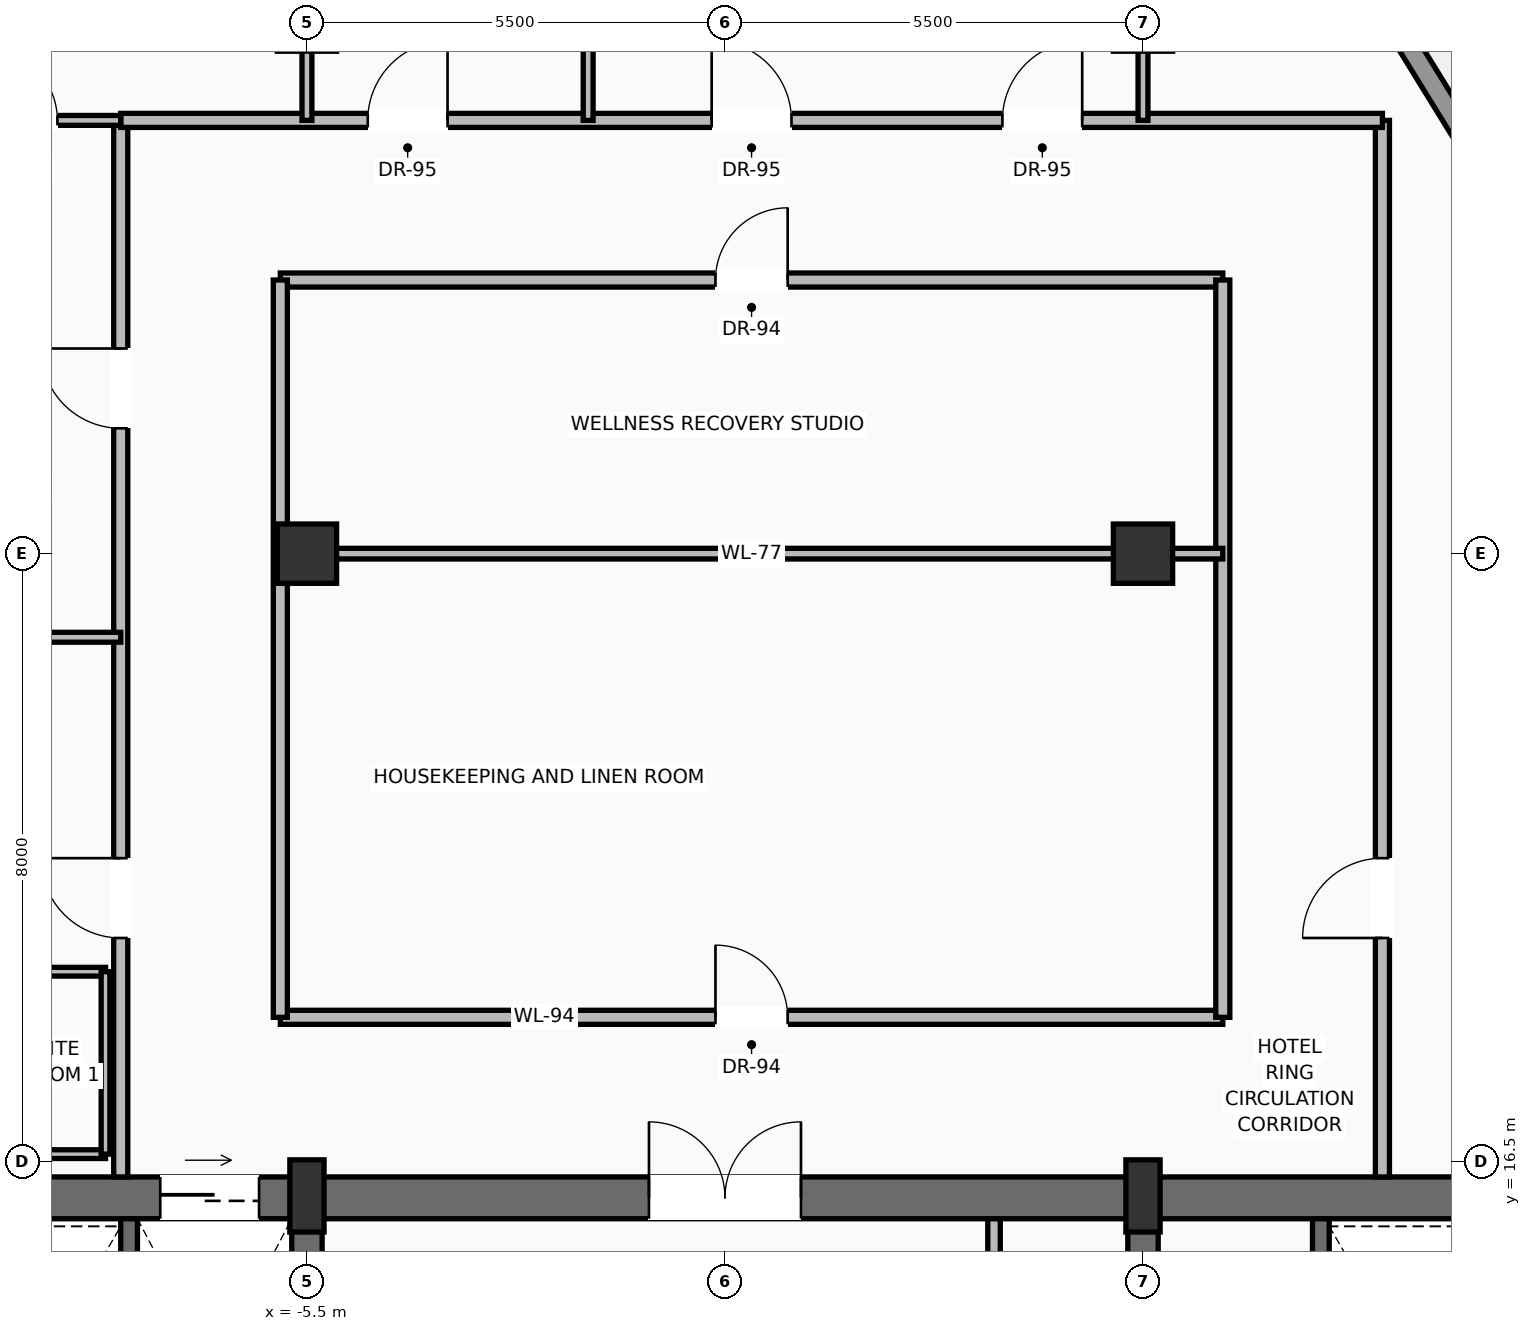
"""IFC4 building model, lengths in metres.
Left out: names, types, materials, properties, quantities, classifications, styles, units other than length and angle.
Written with IfcOpenShell. Run it as: python <this file> out.ifc"""

import sys

from ifc_helpers import new_model, si_unit, direction, frame, frame_2d, origin, origin_2d, place, context, subcontext, project, spatial, rectangle, extrude, source, transform, mapped, element, fill, save


model = new_model("IFC4")
c1 = context("Model", 3, precision=1e-05, world=origin(), true_north=direction((0.0, 1.0)))
c2 = subcontext(c1, "Body", "Model", "MODEL_VIEW")
j1 = project(units=[si_unit("LENGTHUNIT", "METRE"), si_unit("PLANEANGLEUNIT", "RADIAN")], contexts=[c1])
p1 = place(None, origin())
s1 = spatial("IfcSite", under=j1, at=p1, CompositionType="ELEMENT")
p2 = place(p1, origin())
s2 = spatial("IfcBuilding", under=s1, at=p2, CompositionType="ELEMENT")
p3 = place(p2, frame((0.0, 0.0, 240.7)))
s3 = spatial("IfcBuildingStorey", under=s2, at=p3, CompositionType="ELEMENT", Elevation=240.7)
p4 = place(p3, frame((-10.7, 16.025, 0.0), z_axis=(0.0, 0.0, 1.0), x_axis=(1.0, 0.0, 0.0)))
e1 = element("IfcWall", 1, at=p4, inside=s3, PredefinedType="SHEAR", context=c2, shape_type="SweptSolid", body=[
    extrude(rectangle(XDim=21.4, YDim=0.55, at=frame_2d((10.7, 0.0))), origin(), (0.0, 0.0, 1.0), 3.24),
])
p5 = place(p4, frame((3.27, 0.0, 0.0)))
e2 = element("IfcOpeningElement", 2, at=p5, cuts=e1, PredefinedType="OPENING", context=c2, shape_type="SweptSolid", body=[
    extrude(rectangle(XDim=1.3, YDim=2.3, at=frame_2d((0.65, 1.15))), frame((0.0, 0.285, 0.0), z_axis=(0.0, -1.0, 0.0), x_axis=(1.0, 0.0, 0.0)), (0.0, 0.0, 1.0), 0.57),
])
p6 = place(p4, frame((9.7, 0.0, 0.0)))
e3 = element("IfcOpeningElement", 3, at=p6, cuts=e1, PredefinedType="OPENING", context=c2, shape_type="SweptSolid", body=[
    extrude(rectangle(XDim=2.0, YDim=2.4, at=frame_2d((1.0, 1.2))), frame((0.0, 0.285, 0.0), z_axis=(0.0, -1.0, 0.0), x_axis=(1.0, 0.0, 0.0)), (0.0, 0.0, 1.0), 0.57),
])
p7 = place(p3, frame((-5.5, 0.575, 0.0), z_axis=(0.0, 0.0, 1.0), x_axis=(0.0, 1.0, 0.0)))
e4 = element("IfcWall", 4, at=p7, inside=s3, PredefinedType="SHEAR", context=c2, shape_type="SweptSolid", body=[
    extrude(rectangle(XDim=15.45, YDim=0.4, at=frame_2d((7.725, 0.0))), origin(), (0.0, 0.0, 1.0), 3.24),
])
p8 = place(p7, frame((8.925, 0.0, 0.0)))
e5 = element("IfcOpeningElement", 5, at=p8, cuts=e4, PredefinedType="OPENING", context=c2, shape_type="SweptSolid", body=[
    extrude(rectangle(XDim=1.1, YDim=2.2, at=frame_2d((0.55, 1.1))), frame((0.0, 0.21, 0.0), z_axis=(0.0, -1.0, 0.0), x_axis=(1.0, 0.0, 0.0)), (0.0, 0.0, 1.0), 0.42),
])
p9 = place(p3, frame((5.5, 0.575, 0.0), z_axis=(0.0, 0.0, 1.0), x_axis=(0.0, 1.0, 0.0)))
e6 = element("IfcWall", 6, at=p9, inside=s3, PredefinedType="SHEAR", context=c2, shape_type="SweptSolid", body=[
    extrude(rectangle(XDim=15.45, YDim=0.4, at=frame_2d((7.725, 0.0))), origin(), (0.0, 0.0, 1.0), 3.24),
])
p10 = place(p9, frame((8.925, 0.0, 0.0)))
e7 = element("IfcOpeningElement", 7, at=p10, cuts=e6, PredefinedType="OPENING", context=c2, shape_type="SweptSolid", body=[
    extrude(rectangle(XDim=1.1, YDim=2.2, at=frame_2d((0.55, 1.1))), frame((0.0, 0.21, 0.0), z_axis=(0.0, -1.0, 0.0), x_axis=(1.0, 0.0, 0.0)), (0.0, 0.0, 1.0), 0.42),
])
m1 = source(origin(), c2, "Body", "SweptSolid", [
    extrude(rectangle(XDim=0.45, YDim=0.95, at=origin_2d()), origin(), (0.0, 0.0, 1.0), 3.45),
])
for number, where, z_axis, x_axis in (
    (8, (-5.5, 16.05, 0.0), (0.0, 0.0, 1.0), (1.0, 0.0, 0.0)),
    (9, (5.5, 16.05, 0.0), (0.0, 0.0, 1.0), (1.0, 0.0, 0.0)),
):
    element("IfcColumn", number, at=place(p3, frame(where, z_axis=z_axis, x_axis=x_axis)), inside=s3, PredefinedType="PILASTER", context=c2, shape_type="MappedRepresentation", body=[
        mapped(m1, transform((0.0, 0.0, 0.0), scale=1.0)),
    ])
m2 = source(origin(), c2, "Body", "SweptSolid", [
    extrude(rectangle(XDim=0.78, YDim=0.78, at=origin_2d()), origin(), (0.0, 0.0, 1.0), 3.45),
])
for number, where, z_axis, x_axis in (
    (10, (-5.5, 24.5, 0.0), (0.0, 0.0, 1.0), (1.0, 0.0, 0.0)),
    (11, (5.5, 24.5, 0.0), (0.0, 0.0, 1.0), (1.0, 0.0, 0.0)),
):
    element("IfcColumn", number, at=place(p3, frame(where, z_axis=z_axis, x_axis=x_axis)), inside=s3, PredefinedType="COLUMN", context=c2, shape_type="MappedRepresentation", body=[
        mapped(m2, transform((0.0, 0.0, 0.0), scale=1.0)),
    ])
p11 = place(p3, frame((8.468, 32.044, 0.0), z_axis=(0.0, 0.0, 1.0), x_axis=(0.524731986951, -0.851267491374, 0.0)))
e12 = element("IfcWall", 12, at=p11, inside=s3, PredefinedType="SOLIDWALL", context=c2, shape_type="SweptSolid", body=[
    extrude(rectangle(XDim=19.658, YDim=0.28, at=frame_2d((9.829, 0.0))), origin(), (0.0, 0.0, 1.0), 2.82),
])
p12 = place(p11, frame((4.718, 0.0, 0.0)))
e13 = element("IfcOpeningElement", 13, at=p12, cuts=e12, PredefinedType="OPENING", context=c2, shape_type="SweptSolid", body=[
    extrude(rectangle(XDim=1.6, YDim=2.35, at=frame_2d((0.8, 1.175))), frame((0.0, 0.15, 0.0), z_axis=(0.0, -1.0, 0.0), x_axis=(1.0, 0.0, 0.0)), (0.0, 0.0, 1.0), 0.3),
])
p13 = place(p11, frame((13.368, 0.0, 0.9)))
e14 = element("IfcOpeningElement", 14, at=p13, cuts=e12, PredefinedType="OPENING", context=c2, shape_type="SweptSolid", body=[
    extrude(rectangle(XDim=2.0, YDim=1.75, at=frame_2d((1.0, 0.875))), frame((0.0, 0.15, 0.0), z_axis=(0.0, -1.0, 0.0), x_axis=(1.0, 0.0, 0.0)), (0.0, 0.0, 1.0), 0.3),
])
for number, where, z_axis, x_axis in (
    (15, (-7.84, 11.87, 0.0), (0.0, 0.0, 1.0), (0.0, 1.0, 0.0)),
    (16, (7.84, 11.87, 0.0), (0.0, 0.0, 1.0), (0.0, 1.0, 0.0)),
):
    element("IfcWall", number, at=place(p3, frame(where, z_axis=z_axis, x_axis=x_axis)), inside=s3, PredefinedType="SOLIDWALL", context=c2, shape_type="SweptSolid", body=[
        extrude(rectangle(XDim=3.88, YDim=0.22, at=frame_2d((1.94, 0.0))), origin(), (0.0, 0.0, 1.0), 3.24),
    ])
p14 = place(p3, frame((3.54, 11.22, 0.0), z_axis=(0.0, 0.0, 1.0), x_axis=(0.0, 1.0, 0.0)))
e17 = element("IfcWall", 17, at=p14, inside=s3, PredefinedType="PARTITIONING", context=c2, shape_type="SweptSolid", body=[
    extrude(rectangle(XDim=4.53, YDim=0.165, at=frame_2d((2.265, 0.0))), origin(), (0.0, 0.0, 1.0), 3.232),
])
p15 = place(p14, frame((1.25, 0.0, 0.0)))
e18 = element("IfcOpeningElement", 18, at=p15, cuts=e17, PredefinedType="OPENING", context=c2, shape_type="SweptSolid", body=[
    extrude(rectangle(XDim=0.9, YDim=2.1, at=frame_2d((0.45, 1.05))), frame((0.0, 0.093, 0.0), z_axis=(0.0, -1.0, 0.0), x_axis=(1.0, 0.0, 0.0)), (0.0, 0.0, 1.0), 0.185),
])
p16 = place(p3, frame((-5.85, 18.4, 0.0), z_axis=(0.0, 0.0, 1.0), x_axis=(1.0, 0.0, 0.0)))
e19 = element("IfcWall", 19, at=p16, inside=s3, PredefinedType="PARTITIONING", context=c2, shape_type="SweptSolid", body=[
    extrude(rectangle(XDim=12.4, YDim=0.185, at=frame_2d((6.2, 0.0))), origin(), (0.0, 0.0, 1.0), 3.232),
])
p17 = place(p16, frame((5.725, 0.0, 0.0)))
e20 = element("IfcOpeningElement", 20, at=p17, cuts=e19, PredefinedType="OPENING", context=c2, shape_type="SweptSolid", body=[
    extrude(rectangle(XDim=0.95, YDim=2.2, at=frame_2d((0.475, 1.1))), frame((0.0, 0.103, 0.0), z_axis=(0.0, -1.0, 0.0), x_axis=(1.0, 0.0, 0.0)), (0.0, 0.0, 1.0), 0.205),
])
p18 = place(p3, frame((-5.85, 28.1, 0.0), z_axis=(0.0, 0.0, 1.0), x_axis=(1.0, 0.0, 0.0)))
e21 = element("IfcWall", 21, at=p18, inside=s3, PredefinedType="PARTITIONING", context=c2, shape_type="SweptSolid", body=[
    extrude(rectangle(XDim=12.4, YDim=0.185, at=frame_2d((6.2, 0.0))), origin(), (0.0, 0.0, 1.0), 2.885),
])
p19 = place(p18, frame((5.725, 0.0, 0.0)))
e22 = element("IfcOpeningElement", 22, at=p19, cuts=e21, PredefinedType="OPENING", context=c2, shape_type="SweptSolid", body=[
    extrude(rectangle(XDim=0.95, YDim=2.2, at=frame_2d((0.475, 1.1))), frame((0.0, 0.103, 0.0), z_axis=(0.0, -1.0, 0.0), x_axis=(1.0, 0.0, 0.0)), (0.0, 0.0, 1.0), 0.205),
])
for number, where, z_axis, x_axis in (
    (23, (-5.85, 18.4, 0.0), (0.0, 0.0, 1.0), (0.0, 1.0, 0.0)),
    (24, (6.55, 18.4, 0.0), (0.0, 0.0, 1.0), (0.0, 1.0, 0.0)),
):
    element("IfcWall", number, at=place(p3, frame(where, z_axis=z_axis, x_axis=x_axis)), inside=s3, PredefinedType="PARTITIONING", context=c2, shape_type="SweptSolid", body=[
        extrude(rectangle(XDim=9.7, YDim=0.185, at=frame_2d((4.85, 0.0))), origin(), (0.0, 0.0, 1.0), 3.232),
    ])
p20 = place(p3, frame((-7.95, 16.3, 0.0), z_axis=(0.0, 0.0, 1.0), x_axis=(0.0, 1.0, 0.0)))
e25 = element("IfcWall", 25, at=p20, inside=s3, PredefinedType="PARTITIONING", context=c2, shape_type="SweptSolid", body=[
    extrude(rectangle(XDim=13.9, YDim=0.185, at=frame_2d((6.95, 0.0))), origin(), (0.0, 0.0, 1.0), 3.232),
])
p21 = place(p20, frame((3.144, 0.0, 0.0)))
e26 = element("IfcOpeningElement", 26, at=p21, cuts=e25, PredefinedType="OPENING", context=c2, shape_type="SweptSolid", body=[
    extrude(rectangle(XDim=1.05, YDim=2.25, at=frame_2d((0.525, 1.125))), frame((0.0, 0.103, 0.0), z_axis=(0.0, -1.0, 0.0), x_axis=(1.0, 0.0, 0.0)), (0.0, 0.0, 1.0), 0.205),
])
p22 = place(p20, frame((9.849, 0.0, 0.0)))
e27 = element("IfcOpeningElement", 27, at=p22, cuts=e25, PredefinedType="OPENING", context=c2, shape_type="SweptSolid", body=[
    extrude(rectangle(XDim=1.05, YDim=2.25, at=frame_2d((0.525, 1.125))), frame((0.0, 0.103, 0.0), z_axis=(0.0, -1.0, 0.0), x_axis=(1.0, 0.0, 0.0)), (0.0, 0.0, 1.0), 0.205),
])
p23 = place(p3, frame((8.65, 16.3, 0.0), z_axis=(0.0, 0.0, 1.0), x_axis=(0.0, 1.0, 0.0)))
e28 = element("IfcWall", 28, at=p23, inside=s3, PredefinedType="PARTITIONING", context=c2, shape_type="SweptSolid", body=[
    extrude(rectangle(XDim=13.9, YDim=0.185, at=frame_2d((6.95, 0.0))), origin(), (0.0, 0.0, 1.0), 3.232),
])
p24 = place(p23, frame((3.144, 0.0, 0.0)))
e29 = element("IfcOpeningElement", 29, at=p24, cuts=e28, PredefinedType="OPENING", context=c2, shape_type="SweptSolid", body=[
    extrude(rectangle(XDim=1.05, YDim=2.25, at=frame_2d((0.525, 1.125))), frame((0.0, 0.103, 0.0), z_axis=(0.0, -1.0, 0.0), x_axis=(1.0, 0.0, 0.0)), (0.0, 0.0, 1.0), 0.205),
])
p25 = place(p3, frame((-7.95, 30.2, 0.0), z_axis=(0.0, 0.0, 1.0), x_axis=(1.0, 0.0, 0.0)))
e30 = element("IfcWall", 30, at=p25, inside=s3, PredefinedType="PARTITIONING", context=c2, shape_type="SweptSolid", body=[
    extrude(rectangle(XDim=16.6, YDim=0.185, at=frame_2d((8.3, 0.0))), origin(), (0.0, 0.0, 1.0), 3.232),
])
p26 = place(p25, frame((3.25, 0.0, 0.0)))
e31 = element("IfcOpeningElement", 31, at=p26, cuts=e30, PredefinedType="OPENING", context=c2, shape_type="SweptSolid", body=[
    extrude(rectangle(XDim=1.05, YDim=2.25, at=frame_2d((0.525, 1.125))), frame((0.0, 0.103, 0.0), z_axis=(0.0, -1.0, 0.0), x_axis=(1.0, 0.0, 0.0)), (0.0, 0.0, 1.0), 0.205),
])
p27 = place(p25, frame((7.775, 0.0, 0.0)))
e32 = element("IfcOpeningElement", 32, at=p27, cuts=e30, PredefinedType="OPENING", context=c2, shape_type="SweptSolid", body=[
    extrude(rectangle(XDim=1.05, YDim=2.25, at=frame_2d((0.525, 1.125))), frame((0.0, 0.103, 0.0), z_axis=(0.0, -1.0, 0.0), x_axis=(1.0, 0.0, 0.0)), (0.0, 0.0, 1.0), 0.205),
])
p28 = place(p25, frame((11.6, 0.0, 0.0)))
e33 = element("IfcOpeningElement", 33, at=p28, cuts=e30, PredefinedType="OPENING", context=c2, shape_type="SweptSolid", body=[
    extrude(rectangle(XDim=1.05, YDim=2.25, at=frame_2d((0.525, 1.125))), frame((0.0, 0.103, 0.0), z_axis=(0.0, -1.0, 0.0), x_axis=(1.0, 0.0, 0.0)), (0.0, 0.0, 1.0), 0.205),
])
p29 = place(p3, frame((-5.85, 24.5, 0.0), z_axis=(0.0, 0.0, 1.0), x_axis=(1.0, 0.0, 0.0)))
e34 = element("IfcWall", 34, at=p29, inside=s3, PredefinedType="PARTITIONING", context=c2, shape_type="SweptSolid", body=[
    extrude(rectangle(XDim=12.4, YDim=0.14, at=frame_2d((6.2, 0.0))), origin(), (0.0, 0.0, 1.0), 2.683),
])
p30 = place(p3, frame((-10.576, 30.2, 0.0), z_axis=(0.0, 0.0, 1.0), x_axis=(1.0, 0.0, 0.0)))
e35 = element("IfcWall", 35, at=p30, inside=s3, PredefinedType="PARTITIONING", context=c2, shape_type="SweptSolid", body=[
    extrude(rectangle(XDim=2.626, YDim=0.13, at=frame_2d((1.313, 0.0))), origin(), (0.0, 0.0, 1.0), 3.232),
])
p31 = place(p30, frame((0.843, 0.0, 0.0)))
e36 = element("IfcOpeningElement", 36, at=p31, cuts=e35, PredefinedType="OPENING", context=c2, shape_type="SweptSolid", body=[
    extrude(rectangle(XDim=0.95, YDim=2.2, at=frame_2d((0.475, 1.1))), frame((0.0, 0.075, 0.0), z_axis=(0.0, -1.0, 0.0), x_axis=(1.0, 0.0, 0.0)), (0.0, 0.0, 1.0), 0.15),
])
p32 = place(p3, frame((-5.5, 30.2, 0.0), z_axis=(0.0, 0.0, 1.0), x_axis=(0.0, 1.0, 0.0)))
e37 = element("IfcWall", 37, at=p32, inside=s3, PredefinedType="PARTITIONING", context=c2, shape_type="SweptSolid", body=[
    extrude(rectangle(XDim=8.614, YDim=0.13, at=frame_2d((4.307, 0.0))), origin(), (0.0, 0.0, 1.0), 2.683),
])
p33 = place(p3, frame((5.5, 30.2, 0.0), z_axis=(0.0, 0.0, 1.0), x_axis=(0.0, 1.0, 0.0)))
e38 = element("IfcWall", 38, at=p33, inside=s3, PredefinedType="PARTITIONING", context=c2, shape_type="SweptSolid", body=[
    extrude(rectangle(XDim=6.907, YDim=0.13, at=frame_2d((3.454, 0.0))), origin(), (0.0, 0.0, 1.0), 2.683),
])
p34 = place(p3, frame((-1.8, 30.2, 0.0), z_axis=(0.0, 0.0, 1.0), x_axis=(0.0, 1.0, 0.0)))
e39 = element("IfcWall", 39, at=p34, inside=s3, PredefinedType="PARTITIONING", context=c2, shape_type="SweptSolid", body=[
    extrude(rectangle(XDim=12.557, YDim=0.13, at=frame_2d((6.279, 0.0))), origin(), (0.0, 0.0, 1.0), 3.232),
])
for number, where, z_axis, x_axis in (
    (40, (-10.8, 16.6, 0.0), (0.0, 0.0, 1.0), (1.0, 0.0, 0.0)),
    (41, (-10.8, 19.0, 0.0), (0.0, 0.0, 1.0), (1.0, 0.0, 0.0)),
):
    element("IfcWall", number, at=place(p3, frame(where, z_axis=z_axis, x_axis=x_axis)), inside=s3, PredefinedType="PARTITIONING", context=c2, shape_type="SweptSolid", body=[
        extrude(rectangle(XDim=2.65, YDim=0.115, at=frame_2d((1.325, 0.0))), origin(), (0.0, 0.0, 1.0), 3.232),
    ])
p35 = place(p3, frame((-8.15, 16.6, 0.0), z_axis=(0.0, 0.0, 1.0), x_axis=(0.0, 1.0, 0.0)))
e42 = element("IfcWall", 42, at=p35, inside=s3, PredefinedType="PARTITIONING", context=c2, shape_type="SweptSolid", body=[
    extrude(rectangle(XDim=2.4, YDim=0.115, at=frame_2d((1.2, 0.0))), origin(), (0.0, 0.0, 1.0), 3.232),
])
p36 = place(p3, frame((-14.583, 23.4, 0.0), z_axis=(0.0, 0.0, 1.0), x_axis=(1.0, 0.0, 0.0)))
e43 = element("IfcWall", 43, at=p36, inside=s3, PredefinedType="PARTITIONING", context=c2, shape_type="SweptSolid", body=[
    extrude(rectangle(XDim=6.634, YDim=0.13, at=frame_2d((3.317, 0.0))), origin(), (0.0, 0.0, 1.0), 3.232),
])
m3 = source(origin(), c2, "Body", "SweptSolid", [
    extrude(rectangle(XDim=1.3, YDim=2.3, at=frame_2d((0.65, 1.15))), frame((0.0, 0.025, 0.0), z_axis=(0.0, -1.0, 0.0), x_axis=(1.0, 0.0, 0.0)), (0.0, 0.0, 1.0), 0.05),
])
p37 = place(p5, origin())
e44 = element("IfcDoor", 44, at=p37, inside=s3, OperationType="SLIDING_TO_RIGHT", PredefinedType="DOOR", context=c2, shape_type="MappedRepresentation", body=[
    mapped(m3, transform((0.0, 0.0, 0.0), scale=1.0)),
])
fill(e2, e44)
m4 = source(origin(), c2, "Body", "SweptSolid", [
    extrude(rectangle(XDim=2.0, YDim=2.4, at=frame_2d((1.0, 1.2))), frame((0.0, 0.025, 0.0), z_axis=(0.0, -1.0, 0.0), x_axis=(1.0, 0.0, 0.0)), (0.0, 0.0, 1.0), 0.05),
])
p38 = place(p6, origin())
e45 = element("IfcDoor", 45, at=p38, inside=s3, OperationType="DOUBLE_DOOR_SINGLE_SWING", PredefinedType="DOOR", context=c2, shape_type="MappedRepresentation", body=[
    mapped(m4, transform((0.0, 0.0, 0.0), scale=1.0)),
])
fill(e3, e45)
m5 = source(origin(), c2, "Body", "SweptSolid", [
    extrude(rectangle(XDim=0.95, YDim=2.2, at=frame_2d((0.475, 1.1))), frame((0.0, 0.025, 0.0), z_axis=(0.0, -1.0, 0.0), x_axis=(1.0, 0.0, 0.0)), (0.0, 0.0, 1.0), 0.05),
])
p39 = place(p17, origin())
e46 = element("IfcDoor", 46, at=p39, inside=s3, OperationType="SINGLE_SWING_LEFT", PredefinedType="DOOR", context=c2, shape_type="MappedRepresentation", body=[
    mapped(m5, transform((0.0, 0.0, 0.0), scale=1.0)),
])
fill(e20, e46)
p40 = place(p19, origin())
e47 = element("IfcDoor", 47, at=p40, inside=s3, OperationType="SINGLE_SWING_RIGHT", PredefinedType="DOOR", context=c2, shape_type="MappedRepresentation", body=[
    mapped(m5, transform((0.0, 0.0, 0.0), scale=1.0)),
])
fill(e22, e47)
m6 = source(origin(), c2, "Body", "SweptSolid", [
    extrude(rectangle(XDim=1.05, YDim=2.25, at=frame_2d((0.525, 1.125))), frame((0.0, 0.025, 0.0), z_axis=(0.0, -1.0, 0.0), x_axis=(1.0, 0.0, 0.0)), (0.0, 0.0, 1.0), 0.05),
])
p41 = place(p21, origin())
e48 = element("IfcDoor", 48, at=p41, inside=s3, OperationType="SINGLE_SWING_RIGHT", PredefinedType="DOOR", context=c2, shape_type="MappedRepresentation", body=[
    mapped(m6, transform((0.0, 0.0, 0.0), scale=1.0)),
])
fill(e26, e48)
p42 = place(p22, origin())
e49 = element("IfcDoor", 49, at=p42, inside=s3, OperationType="SINGLE_SWING_RIGHT", PredefinedType="DOOR", context=c2, shape_type="MappedRepresentation", body=[
    mapped(m6, transform((0.0, 0.0, 0.0), scale=1.0)),
])
fill(e27, e49)
p43 = place(p24, origin())
e50 = element("IfcDoor", 50, at=p43, inside=s3, OperationType="SINGLE_SWING_LEFT", PredefinedType="DOOR", context=c2, shape_type="MappedRepresentation", body=[
    mapped(m6, transform((0.0, 0.0, 0.0), scale=1.0)),
])
fill(e29, e50)
p44 = place(p26, origin())
e51 = element("IfcDoor", 51, at=p44, inside=s3, OperationType="SINGLE_SWING_RIGHT", PredefinedType="DOOR", context=c2, shape_type="MappedRepresentation", body=[
    mapped(m6, transform((0.0, 0.0, 0.0), scale=1.0)),
])
fill(e31, e51)
p45 = place(p27, origin())
e52 = element("IfcDoor", 52, at=p45, inside=s3, OperationType="SINGLE_SWING_LEFT", PredefinedType="DOOR", context=c2, shape_type="MappedRepresentation", body=[
    mapped(m6, transform((0.0, 0.0, 0.0), scale=1.0)),
])
fill(e32, e52)
p46 = place(p28, origin())
e53 = element("IfcDoor", 53, at=p46, inside=s3, OperationType="SINGLE_SWING_RIGHT", PredefinedType="DOOR", context=c2, shape_type="MappedRepresentation", body=[
    mapped(m6, transform((0.0, 0.0, 0.0), scale=1.0)),
])
fill(e33, e53)
p47 = place(p31, origin())
e54 = element("IfcDoor", 54, at=p47, inside=s3, OperationType="SINGLE_SWING_LEFT", PredefinedType="DOOR", context=c2, shape_type="MappedRepresentation", body=[
    mapped(m5, transform((0.0, 0.0, 0.0), scale=1.0)),
])
fill(e36, e54)
save(model, sys.argv[1])
